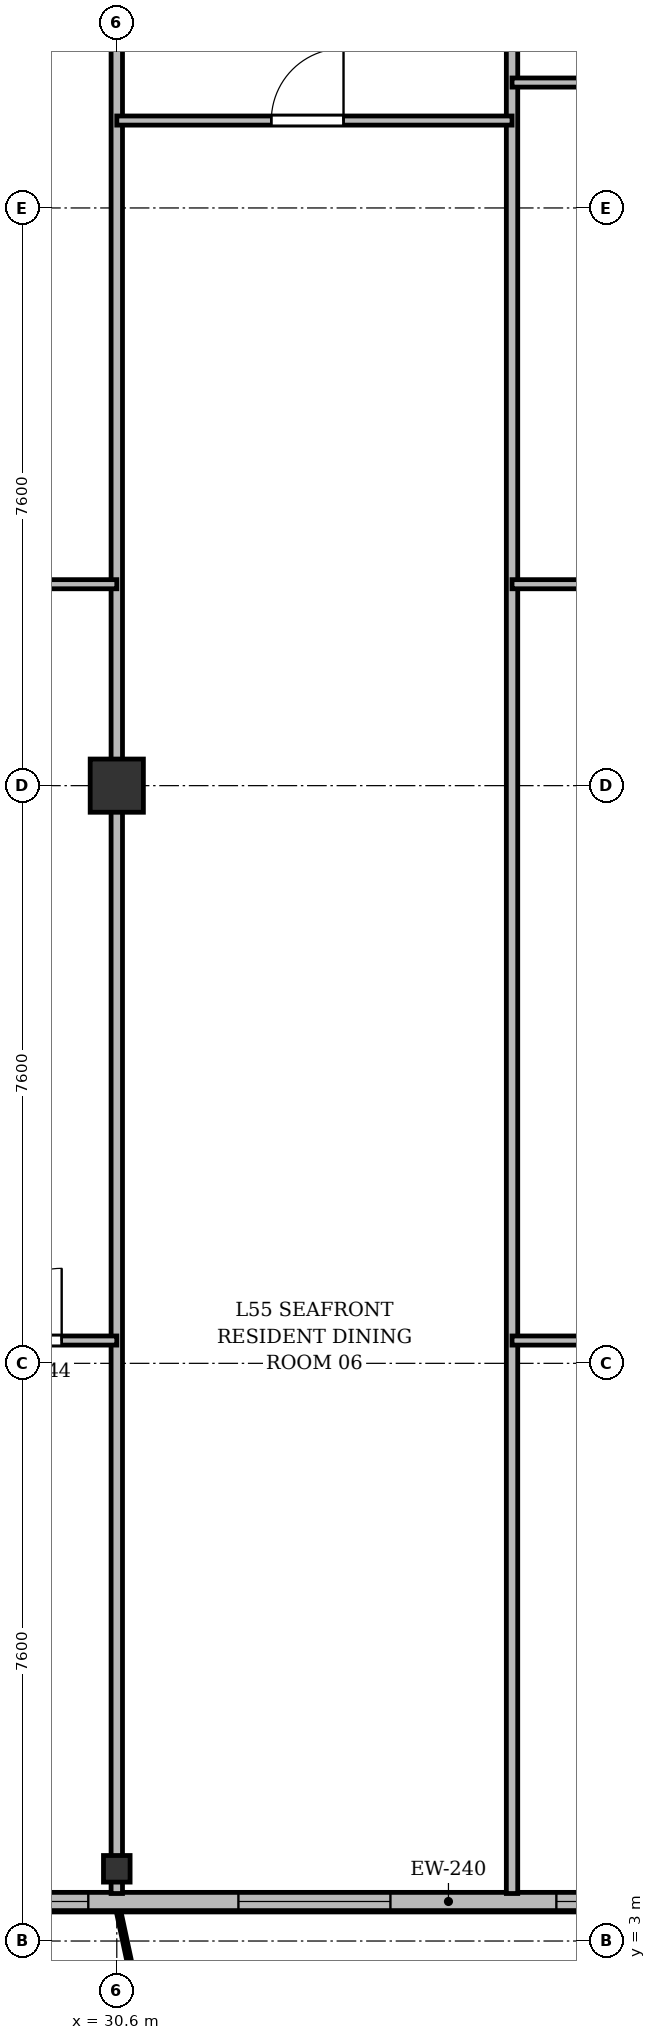
"""IFC4 building model, lengths in metres.
Left out: names, types, materials, properties, quantities, classifications, styles, units other than length and angle.
Written with IfcOpenShell. Run it as: python <this file> out.ifc"""

import sys

from ifc_helpers import new_model, si_unit, direction, frame, frame_2d, origin, origin_2d, place, context, subcontext, project, spatial, rectangle, i_section, extrude, source, transform, mapped, element, fill, save


model = new_model("IFC4")
c1 = context("Model", 3, precision=1e-05, world=origin(), true_north=direction((0.0, 1.0)))
c2 = subcontext(c1, "Body", "Model", "MODEL_VIEW")
j1 = project(units=[si_unit("LENGTHUNIT", "METRE"), si_unit("PLANEANGLEUNIT", "RADIAN")], contexts=[c1])
p1 = place(None, origin())
s1 = spatial("IfcSite", under=j1, at=p1, CompositionType="ELEMENT")
p2 = place(p1, origin())
s2 = spatial("IfcBuilding", under=s1, at=p2, CompositionType="ELEMENT")
p3 = place(p2, frame((0.0, 0.0, 212.1)))
s3 = spatial("IfcBuildingStorey", under=s2, at=p3, CompositionType="ELEMENT", Elevation=212.1)
m1 = source(origin(), c2, "Body", "SweptSolid", [
    extrude(i_section(OverallWidth=0.35, OverallDepth=0.35, WebThickness=0.018, FlangeThickness=0.028, at=origin_2d()), origin(), (0.0, 0.0, 1.0), 3.6),
])
p4 = place(p3, frame((30.6, 3.95, 0.0), z_axis=(0.0, 0.0, 1.0), x_axis=(1.0, 0.0, 0.0)))
e1 = element("IfcColumn", 1, at=p4, inside=s3, PredefinedType="COLUMN", context=c2, shape_type="MappedRepresentation", body=[
    mapped(m1, transform((0.0, 0.0, 0.0), x_axis=(1.0, 0.0, 0.0), y_axis=(0.0, 1.0, 0.0), z_axis=(0.0, 0.0, 1.0), scale=1.0)),
])
m2 = source(origin(), c2, "Body", "SweptSolid", [
    extrude(rectangle(XDim=0.7, YDim=0.7, at=origin_2d()), origin(), (0.0, 0.0, 1.0), 3.6),
])
p5 = place(p3, frame((30.6, 18.2, 0.0), z_axis=(0.0, 0.0, 1.0), x_axis=(1.0, 0.0, 0.0)))
e2 = element("IfcColumn", 2, at=p5, inside=s3, PredefinedType="COLUMN", context=c2, shape_type="MappedRepresentation", body=[
    mapped(m2, transform((0.0, 0.0, 0.0), x_axis=(1.0, 0.0, 0.0), y_axis=(0.0, 1.0, 0.0), z_axis=(0.0, 0.0, 1.0), scale=1.0)),
])
p6 = place(p3, frame((63.4, 3.52, 0.0), z_axis=(0.0, 0.0, 1.0), x_axis=(-1.0, 0.0, 0.0)))
e3 = element("IfcWall", 3, at=p6, inside=s3, PredefinedType="SOLIDWALL", context=c2, shape_type="SweptSolid", body=[
    extrude(rectangle(XDim=52.4, YDim=0.24, at=frame_2d((26.2, 0.0))), origin(), (0.0, 0.0, 1.0), 3.36),
])
p7 = place(p6, frame((1.445, 0.0, 0.9)))
e4 = element("IfcOpeningElement", 4, at=p7, cuts=e3, PredefinedType="OPENING", context=c2, shape_type="SweptSolid", body=[
    extrude(rectangle(XDim=1.8, YDim=1.8, at=frame_2d((0.9, 0.9))), frame((0.0, 0.13, 0.0), z_axis=(0.0, -1.0, 0.0), x_axis=(1.0, 0.0, 0.0)), (0.0, 0.0, 1.0), 0.26),
])
p8 = place(p6, frame((5.15, 0.0, 0.9)))
e5 = element("IfcOpeningElement", 5, at=p8, cuts=e3, PredefinedType="OPENING", context=c2, shape_type="SweptSolid", body=[
    extrude(rectangle(XDim=1.5, YDim=1.75, at=frame_2d((0.75, 0.875))), frame((0.0, 0.13, 0.0), z_axis=(0.0, -1.0, 0.0), x_axis=(1.0, 0.0, 0.0)), (0.0, 0.0, 1.0), 0.26),
])
p9 = place(p6, frame((7.45, 0.0, 0.9)))
e6 = element("IfcOpeningElement", 6, at=p9, cuts=e3, PredefinedType="OPENING", context=c2, shape_type="SweptSolid", body=[
    extrude(rectangle(XDim=1.5, YDim=1.75, at=frame_2d((0.75, 0.875))), frame((0.0, 0.13, 0.0), z_axis=(0.0, -1.0, 0.0), x_axis=(1.0, 0.0, 0.0)), (0.0, 0.0, 1.0), 0.26),
])
p10 = place(p6, frame((9.8, 0.0, 0.9)))
e7 = element("IfcOpeningElement", 7, at=p10, cuts=e3, PredefinedType="OPENING", context=c2, shape_type="SweptSolid", body=[
    extrude(rectangle(XDim=2.0, YDim=1.95, at=frame_2d((1.0, 0.975))), frame((0.0, 0.13, 0.0), z_axis=(0.0, -1.0, 0.0), x_axis=(1.0, 0.0, 0.0)), (0.0, 0.0, 1.0), 0.26),
])
p11 = place(p6, frame((14.217, 0.0, 0.0)))
e8 = element("IfcOpeningElement", 8, at=p11, cuts=e3, PredefinedType="OPENING", context=c2, shape_type="SweptSolid", body=[
    extrude(rectangle(XDim=1.2, YDim=2.2, at=frame_2d((0.6, 1.1))), frame((0.0, 0.13, 0.0), z_axis=(0.0, -1.0, 0.0), x_axis=(1.0, 0.0, 0.0)), (0.0, 0.0, 1.0), 0.26),
])
p12 = place(p6, frame((20.034, 0.0, 0.9)))
e9 = element("IfcOpeningElement", 9, at=p12, cuts=e3, PredefinedType="OPENING", context=c2, shape_type="SweptSolid", body=[
    extrude(rectangle(XDim=1.8, YDim=1.8, at=frame_2d((0.9, 0.9))), frame((0.0, 0.13, 0.0), z_axis=(0.0, -1.0, 0.0), x_axis=(1.0, 0.0, 0.0)), (0.0, 0.0, 1.0), 0.26),
])
p13 = place(p6, frame((22.5, 0.0, 0.9)))
e10 = element("IfcOpeningElement", 10, at=p13, cuts=e3, PredefinedType="OPENING", context=c2, shape_type="SweptSolid", body=[
    extrude(rectangle(XDim=2.2, YDim=1.8, at=frame_2d((1.1, 0.9))), frame((0.0, 0.13, 0.0), z_axis=(0.0, -1.0, 0.0), x_axis=(1.0, 0.0, 0.0)), (0.0, 0.0, 1.0), 0.26),
])
p14 = place(p6, frame((25.517, 0.0, 0.9)))
e11 = element("IfcOpeningElement", 11, at=p14, cuts=e3, PredefinedType="OPENING", context=c2, shape_type="SweptSolid", body=[
    extrude(rectangle(XDim=1.5, YDim=1.75, at=frame_2d((0.75, 0.875))), frame((0.0, 0.13, 0.0), z_axis=(0.0, -1.0, 0.0), x_axis=(1.0, 0.0, 0.0)), (0.0, 0.0, 1.0), 0.26),
])
p15 = place(p6, frame((29.2, 0.0, 0.9)))
e12 = element("IfcOpeningElement", 12, at=p15, cuts=e3, PredefinedType="OPENING", context=c2, shape_type="SweptSolid", body=[
    extrude(rectangle(XDim=2.0, YDim=1.95, at=frame_2d((1.0, 0.975))), frame((0.0, 0.13, 0.0), z_axis=(0.0, -1.0, 0.0), x_axis=(1.0, 0.0, 0.0)), (0.0, 0.0, 1.0), 0.26),
])
p16 = place(p6, frame((33.175, 0.0, 0.9)))
e13 = element("IfcOpeningElement", 13, at=p16, cuts=e3, PredefinedType="OPENING", context=c2, shape_type="SweptSolid", body=[
    extrude(rectangle(XDim=1.65, YDim=1.85, at=frame_2d((0.825, 0.925))), frame((0.0, 0.13, 0.0), z_axis=(0.0, -1.0, 0.0), x_axis=(1.0, 0.0, 0.0)), (0.0, 0.0, 1.0), 0.26),
])
p17 = place(p6, frame((35.5, 0.0, 0.9)))
e14 = element("IfcOpeningElement", 14, at=p17, cuts=e3, PredefinedType="OPENING", context=c2, shape_type="SweptSolid", body=[
    extrude(rectangle(XDim=1.8, YDim=1.8, at=frame_2d((0.9, 0.9))), frame((0.0, 0.13, 0.0), z_axis=(0.0, -1.0, 0.0), x_axis=(1.0, 0.0, 0.0)), (0.0, 0.0, 1.0), 0.26),
])
p18 = place(p6, frame((38.05, 0.0, 0.9)))
e15 = element("IfcOpeningElement", 15, at=p18, cuts=e3, PredefinedType="OPENING", context=c2, shape_type="SweptSolid", body=[
    extrude(rectangle(XDim=1.5, YDim=1.75, at=frame_2d((0.75, 0.875))), frame((0.0, 0.13, 0.0), z_axis=(0.0, -1.0, 0.0), x_axis=(1.0, 0.0, 0.0)), (0.0, 0.0, 1.0), 0.26),
])
p19 = place(p6, frame((41.456, 0.0, 0.0)))
e16 = element("IfcOpeningElement", 16, at=p19, cuts=e3, PredefinedType="OPENING", context=c2, shape_type="SweptSolid", body=[
    extrude(rectangle(XDim=1.2, YDim=2.2, at=frame_2d((0.6, 1.1))), frame((0.0, 0.13, 0.0), z_axis=(0.0, -1.0, 0.0), x_axis=(1.0, 0.0, 0.0)), (0.0, 0.0, 1.0), 0.26),
])
p20 = place(p6, frame((43.45, 0.0, 0.9)))
e17 = element("IfcOpeningElement", 17, at=p20, cuts=e3, PredefinedType="OPENING", context=c2, shape_type="SweptSolid", body=[
    extrude(rectangle(XDim=1.5, YDim=1.75, at=frame_2d((0.75, 0.875))), frame((0.0, 0.13, 0.0), z_axis=(0.0, -1.0, 0.0), x_axis=(1.0, 0.0, 0.0)), (0.0, 0.0, 1.0), 0.26),
])
p21 = place(p6, frame((45.675, 0.0, 0.9)))
e18 = element("IfcOpeningElement", 18, at=p21, cuts=e3, PredefinedType="OPENING", context=c2, shape_type="SweptSolid", body=[
    extrude(rectangle(XDim=1.65, YDim=1.85, at=frame_2d((0.825, 0.925))), frame((0.0, 0.13, 0.0), z_axis=(0.0, -1.0, 0.0), x_axis=(1.0, 0.0, 0.0)), (0.0, 0.0, 1.0), 0.26),
])
p22 = place(p6, frame((49.155, 0.0, 0.9)))
e19 = element("IfcOpeningElement", 19, at=p22, cuts=e3, PredefinedType="OPENING", context=c2, shape_type="SweptSolid", body=[
    extrude(rectangle(XDim=1.8, YDim=1.8, at=frame_2d((0.9, 0.9))), frame((0.0, 0.13, 0.0), z_axis=(0.0, -1.0, 0.0), x_axis=(1.0, 0.0, 0.0)), (0.0, 0.0, 1.0), 0.26),
])
p23 = place(p3, frame((30.6, 3.625, 0.0), z_axis=(0.0, 0.0, 1.0), x_axis=(0.0, 1.0, 0.0)))
e20 = element("IfcWall", 20, at=p23, inside=s3, PredefinedType="PARTITIONING", context=c2, shape_type="SweptSolid", body=[
    extrude(rectangle(XDim=27.175, YDim=0.15, at=frame_2d((13.587, 0.0))), origin(), (0.0, 0.0, 1.0), 2.86),
])
p24 = place(p3, frame((35.8, 3.625, 0.0), z_axis=(0.0, 0.0, 1.0), x_axis=(0.0, 1.0, 0.0)))
e21 = element("IfcWall", 21, at=p24, inside=s3, PredefinedType="PARTITIONING", context=c2, shape_type="SweptSolid", body=[
    extrude(rectangle(XDim=27.175, YDim=0.15, at=frame_2d((13.587, 0.0))), origin(), (0.0, 0.0, 1.0), 2.91),
])
p25 = place(p3, frame((23.4, 20.85, 0.0), z_axis=(0.0, 0.0, 1.0), x_axis=(1.0, 0.0, 0.0)))
e22 = element("IfcWall", 22, at=p25, inside=s3, PredefinedType="PARTITIONING", context=c2, shape_type="SweptSolid", body=[
    extrude(rectangle(XDim=7.2, YDim=0.12, at=frame_2d((3.6, 0.0))), origin(), (0.0, 0.0, 1.0), 2.86),
])
p26 = place(p25, frame((3.125, 0.0, 0.0)))
e23 = element("IfcOpeningElement", 23, at=p26, cuts=e22, PredefinedType="OPENING", context=c2, shape_type="SweptSolid", body=[
    extrude(rectangle(XDim=0.95, YDim=2.15, at=frame_2d((0.475, 1.075))), frame((0.0, 0.07, 0.0), z_axis=(0.0, -1.0, 0.0), x_axis=(1.0, 0.0, 0.0)), (0.0, 0.0, 1.0), 0.14),
])
p27 = place(p3, frame((28.2, 10.9, 0.0), z_axis=(0.0, 0.0, 1.0), x_axis=(1.0, 0.0, 0.0)))
e24 = element("IfcWall", 24, at=p27, inside=s3, PredefinedType="PARTITIONING", context=c2, shape_type="SweptSolid", body=[
    extrude(rectangle(XDim=2.4, YDim=0.12, at=frame_2d((1.2, 0.0))), origin(), (0.0, 0.0, 1.0), 2.86),
])
p28 = place(p27, frame((0.725, 0.0, 0.0)))
e25 = element("IfcOpeningElement", 25, at=p28, cuts=e24, PredefinedType="OPENING", context=c2, shape_type="SweptSolid", body=[
    extrude(rectangle(XDim=0.95, YDim=2.15, at=frame_2d((0.475, 1.075))), frame((0.0, 0.07, 0.0), z_axis=(0.0, -1.0, 0.0), x_axis=(1.0, 0.0, 0.0)), (0.0, 0.0, 1.0), 0.14),
])
p29 = place(p3, frame((30.6, 26.95, 0.0), z_axis=(0.0, 0.0, 1.0), x_axis=(1.0, 0.0, 0.0)))
e26 = element("IfcWall", 26, at=p29, inside=s3, PredefinedType="PARTITIONING", context=c2, shape_type="SweptSolid", body=[
    extrude(rectangle(XDim=5.2, YDim=0.12, at=frame_2d((2.6, 0.0))), origin(), (0.0, 0.0, 1.0), 2.86),
])
p30 = place(p29, frame((2.033, 0.0, 0.0)))
e27 = element("IfcOpeningElement", 27, at=p30, cuts=e26, PredefinedType="OPENING", context=c2, shape_type="SweptSolid", body=[
    extrude(rectangle(XDim=0.95, YDim=2.15, at=frame_2d((0.475, 1.075))), frame((0.0, 0.07, 0.0), z_axis=(0.0, -1.0, 0.0), x_axis=(1.0, 0.0, 0.0)), (0.0, 0.0, 1.0), 0.14),
])
p31 = place(p3, frame((35.8, 20.85, 0.0), z_axis=(0.0, 0.0, 1.0), x_axis=(1.0, 0.0, 0.0)))
e28 = element("IfcWall", 28, at=p31, inside=s3, PredefinedType="PARTITIONING", context=c2, shape_type="SweptSolid", body=[
    extrude(rectangle(XDim=8.0, YDim=0.12, at=frame_2d((4.0, 0.0))), origin(), (0.0, 0.0, 1.0), 2.86),
])
p32 = place(p31, frame((3.525, 0.0, 0.0)))
e29 = element("IfcOpeningElement", 29, at=p32, cuts=e28, PredefinedType="OPENING", context=c2, shape_type="SweptSolid", body=[
    extrude(rectangle(XDim=0.95, YDim=2.15, at=frame_2d((0.475, 1.075))), frame((0.0, 0.07, 0.0), z_axis=(0.0, -1.0, 0.0), x_axis=(1.0, 0.0, 0.0)), (0.0, 0.0, 1.0), 0.14),
])
p33 = place(p3, frame((35.8, 27.45, 0.0), z_axis=(0.0, 0.0, 1.0), x_axis=(1.0, 0.0, 0.0)))
e30 = element("IfcWall", 30, at=p33, inside=s3, PredefinedType="PARTITIONING", context=c2, shape_type="SweptSolid", body=[
    extrude(rectangle(XDim=2.4, YDim=0.12, at=frame_2d((1.2, 0.0))), origin(), (0.0, 0.0, 1.0), 3.36),
])
p34 = place(p3, frame((35.8, 10.9, 0.0), z_axis=(0.0, 0.0, 1.0), x_axis=(1.0, 0.0, 0.0)))
e31 = element("IfcWall", 31, at=p34, inside=s3, PredefinedType="PARTITIONING", context=c2, shape_type="SweptSolid", body=[
    extrude(rectangle(XDim=2.667, YDim=0.12, at=frame_2d((1.333, 0.0))), origin(), (0.0, 0.0, 1.0), 3.36),
])
p35 = place(p34, frame((0.859, 0.0, 0.0)))
e32 = element("IfcOpeningElement", 32, at=p35, cuts=e31, PredefinedType="OPENING", context=c2, shape_type="SweptSolid", body=[
    extrude(rectangle(XDim=0.95, YDim=2.15, at=frame_2d((0.475, 1.075))), frame((0.0, 0.07, 0.0), z_axis=(0.0, -1.0, 0.0), x_axis=(1.0, 0.0, 0.0)), (0.0, 0.0, 1.0), 0.14),
])
m3 = source(origin(), c2, "Body", "SweptSolid", [
    extrude(rectangle(XDim=1.5, YDim=1.75, at=frame_2d((0.75, 0.875))), frame((0.0, 0.03, 0.0), z_axis=(0.0, -1.0, 0.0), x_axis=(1.0, 0.0, 0.0)), (0.0, 0.0, 1.0), 0.06),
])
p36 = place(p14, origin())
e33 = element("IfcWindow", 33, at=p36, inside=s3, PartitioningType="SINGLE_PANEL", PredefinedType="WINDOW", context=c2, shape_type="MappedRepresentation", body=[
    mapped(m3, transform((0.0, 0.0, 0.0), x_axis=(1.0, 0.0, 0.0), y_axis=(0.0, 1.0, 0.0), z_axis=(0.0, 0.0, 1.0), scale=1.0)),
])
fill(e11, e33)
m4 = source(origin(), c2, "Body", "SweptSolid", [
    extrude(rectangle(XDim=2.0, YDim=1.95, at=frame_2d((1.0, 0.975))), frame((0.0, 0.03, 0.0), z_axis=(0.0, -1.0, 0.0), x_axis=(1.0, 0.0, 0.0)), (0.0, 0.0, 1.0), 0.06),
])
p37 = place(p15, origin())
e34 = element("IfcWindow", 34, at=p37, inside=s3, PartitioningType="SINGLE_PANEL", PredefinedType="WINDOW", context=c2, shape_type="MappedRepresentation", body=[
    mapped(m4, transform((0.0, 0.0, 0.0), x_axis=(1.0, 0.0, 0.0), y_axis=(0.0, 1.0, 0.0), z_axis=(0.0, 0.0, 1.0), scale=1.0)),
])
fill(e12, e34)
m5 = source(origin(), c2, "Body", "SweptSolid", [
    extrude(rectangle(XDim=1.65, YDim=1.85, at=frame_2d((0.825, 0.925))), frame((0.0, 0.03, 0.0), z_axis=(0.0, -1.0, 0.0), x_axis=(1.0, 0.0, 0.0)), (0.0, 0.0, 1.0), 0.06),
])
p38 = place(p16, origin())
e35 = element("IfcWindow", 35, at=p38, inside=s3, PartitioningType="SINGLE_PANEL", PredefinedType="WINDOW", context=c2, shape_type="MappedRepresentation", body=[
    mapped(m5, transform((0.0, 0.0, 0.0), x_axis=(1.0, 0.0, 0.0), y_axis=(0.0, 1.0, 0.0), z_axis=(0.0, 0.0, 1.0), scale=1.0)),
])
fill(e13, e35)
m6 = source(origin(), c2, "Body", "SweptSolid", [
    extrude(rectangle(XDim=0.95, YDim=2.15, at=frame_2d((0.475, 1.075))), frame((0.0, 0.025, 0.0), z_axis=(0.0, -1.0, 0.0), x_axis=(1.0, 0.0, 0.0)), (0.0, 0.0, 1.0), 0.05),
])
p39 = place(p28, origin())
e36 = element("IfcDoor", 36, at=p39, inside=s3, OperationType="SINGLE_SWING_RIGHT", PredefinedType="DOOR", context=c2, shape_type="MappedRepresentation", body=[
    mapped(m6, transform((0.0, 0.0, 0.0), x_axis=(1.0, 0.0, 0.0), y_axis=(0.0, 1.0, 0.0), z_axis=(0.0, 0.0, 1.0), scale=1.0)),
])
fill(e25, e36)
p40 = place(p30, origin())
e37 = element("IfcDoor", 37, at=p40, inside=s3, OperationType="SINGLE_SWING_RIGHT", PredefinedType="DOOR", context=c2, shape_type="MappedRepresentation", body=[
    mapped(m6, transform((0.0, 0.0, 0.0), x_axis=(1.0, 0.0, 0.0), y_axis=(0.0, 1.0, 0.0), z_axis=(0.0, 0.0, 1.0), scale=1.0)),
])
fill(e27, e37)
save(model, sys.argv[1])
